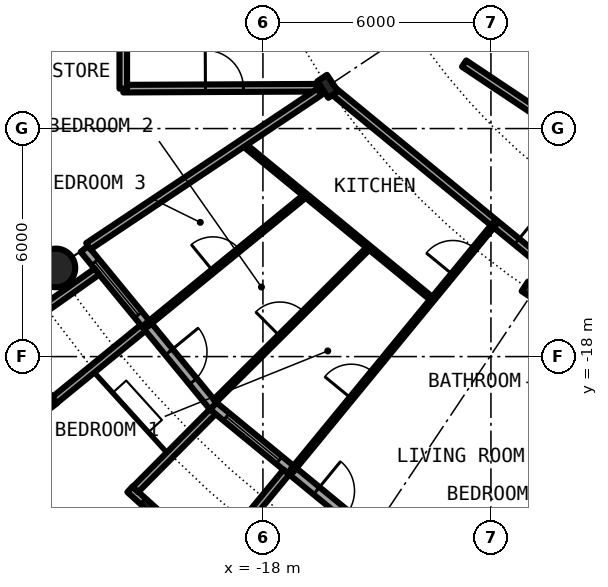
"""IFC4 building model, lengths in metres.
Left out: names, types, materials, properties, quantities, classifications, styles, units other than length and angle.
Written with IfcOpenShell. Run it as: python <this file> out.ifc"""

import sys

from ifc_helpers import new_model, si_unit, direction, frame, frame_2d, origin, origin_2d, place, context, subcontext, project, spatial, rectangle, circle, hollow_circle, i_section, extrude, element, fill, save


model = new_model("IFC4")
c1 = context("Model", 3, precision=1e-05, world=origin(), true_north=direction((0.0, 1.0)))
c2 = subcontext(c1, "Body", "Model", "MODEL_VIEW")
j1 = project(units=[si_unit("LENGTHUNIT", "METRE"), si_unit("PLANEANGLEUNIT", "RADIAN")], contexts=[c1])
p1 = place(None, origin())
s1 = spatial("IfcSite", under=j1, at=p1, CompositionType="ELEMENT")
p2 = place(p1, origin())
s2 = spatial("IfcBuilding", under=s1, at=p2, CompositionType="ELEMENT")
p3 = place(p2, frame((0.0, 0.0, 91.05)))
s3 = spatial("IfcBuildingStorey", under=s2, at=p3, CompositionType="ELEMENT", Elevation=91.05)
p4 = place(p3, frame((-23.448, -15.667, 0.0), z_axis=(0.0, 0.0, 1.0), x_axis=(1.0, 0.0, 0.0)))
e1 = element("IfcColumn", 1, at=p4, inside=s3, PredefinedType="COLUMN", context=c2, shape_type="SweptSolid", body=[
    extrude(hollow_circle(Radius=0.508, WallThickness=0.04, at=origin_2d()), origin(), (0.0, 0.0, 1.0), 3.05),
])
for number, where, z_axis, x_axis in (
    (2, (-16.297, -10.889, 0.0), (0.0, 0.0, 1.0), (-0.831, -0.556, 0.0)),
    (3, (-10.889, -16.297, 0.0), (0.0, 0.0, 1.0), (-0.556, -0.831, 0.0)),
):
    element("IfcColumn", number, at=place(p3, frame(where, z_axis=z_axis, x_axis=x_axis)), inside=s3, PredefinedType="COLUMN", context=c2, shape_type="SweptSolid", body=[
        extrude(i_section(OverallWidth=0.306, OverallDepth=0.524, WebThickness=0.021, FlangeThickness=0.04, FilletRadius=0.027, at=origin_2d()), origin(), (0.0, 0.0, 1.0), 3.05),
    ])
p5 = place(p3, frame((-22.699, -15.167, 0.0), z_axis=(0.0, 0.0, 1.0), x_axis=(0.634382322723, -0.773019449054, 0.0)))
e4 = element("IfcWall", 4, at=p5, inside=s3, PredefinedType="SOLIDWALL", context=c2, shape_type="SweptSolid", body=[
    extrude(rectangle(XDim=5.352, YDim=0.25, at=frame_2d((2.676, 0.0))), origin(), (0.0, 0.0, 1.0), 2.7),
])
p6 = place(p5, frame((0.441, 0.0, 0.3)))
e5 = element("IfcOpeningElement", 5, at=p6, cuts=e4, PredefinedType="OPENING", context=c2, shape_type="SweptSolid", body=[
    extrude(rectangle(XDim=1.8, YDim=2.1, at=frame_2d((0.9, 1.05))), frame((0.0, 0.135, 0.0), z_axis=(0.0, -1.0, 0.0), x_axis=(1.0, 0.0, 0.0)), (0.0, 0.0, 1.0), 0.27),
])
p7 = place(p5, frame((3.51, 0.0, 0.0)))
e6 = element("IfcOpeningElement", 6, at=p7, cuts=e4, PredefinedType="OPENING", context=c2, shape_type="SweptSolid", body=[
    extrude(rectangle(XDim=1.0, YDim=2.2, at=frame_2d((0.5, 1.1))), frame((0.0, 0.135, 0.0), z_axis=(0.0, -1.0, 0.0), x_axis=(1.0, 0.0, 0.0)), (0.0, 0.0, 1.0), 0.27),
])
p8 = place(p3, frame((-24.909, -17.427, -0.03), z_axis=(0.0, 0.0, 1.0), x_axis=(0.60418752353, -0.796842165306, 0.0)))
e7 = element("IfcWall", 7, at=p8, inside=s3, PredefinedType="SOLIDWALL", context=c2, shape_type="SweptSolid", body=[
    extrude(rectangle(XDim=2.337, YDim=0.2, at=frame_2d((1.168, 0.0))), origin(), (0.0, 0.0, 1.0), 2.73),
])
p9 = place(p8, frame((0.128, 0.0, 0.33)))
e8 = element("IfcOpeningElement", 8, at=p9, cuts=e7, PredefinedType="OPENING", context=c2, shape_type="SweptSolid", body=[
    extrude(circle(Radius=1.04, at=frame_2d((1.04, 1.04))), frame((0.0, 0.11, 0.0), z_axis=(0.0, -1.0, 0.0), x_axis=(1.0, 0.0, 0.0)), (0.0, 0.0, 1.0), 0.22),
])
p10 = place(p3, frame((-22.37, -15.765, -0.03), z_axis=(0.0, 0.0, 1.0), x_axis=(-0.817256123454, -0.576274612209, 0.0)))
e9 = element("IfcWall", 9, at=p10, inside=s3, PredefinedType="SOLIDWALL", context=c2, shape_type="SweptSolid", body=[
    extrude(rectangle(XDim=2.933, YDim=0.2, at=frame_2d((1.466, 0.0))), origin(), (0.0, 0.0, 1.0), 2.73),
])
p11 = place(p3, frame((-21.155, -17.246, -0.03), z_axis=(0.0, 0.0, 1.0), x_axis=(-0.775179004516, -0.631741648902, 0.0)))
e10 = element("IfcWall", 10, at=p11, inside=s3, PredefinedType="SOLIDWALL", context=c2, shape_type="SweptSolid", body=[
    extrude(rectangle(XDim=3.006, YDim=0.2, at=frame_2d((1.503, 0.0))), origin(), (0.0, 0.0, 1.0), 2.73),
])
p12 = place(p3, frame((-19.304, -19.304, 0.0), z_axis=(0.0, 0.0, 1.0), x_axis=(0.773019449054, -0.634382322723, 0.0)))
e11 = element("IfcWall", 11, at=p12, inside=s3, PredefinedType="SOLIDWALL", context=c2, shape_type="SweptSolid", body=[
    extrude(rectangle(XDim=5.352, YDim=0.25, at=frame_2d((2.676, 0.0))), origin(), (0.0, 0.0, 1.0), 2.7),
])
p13 = place(p12, frame((0.441, 0.0, 0.3)))
e12 = element("IfcOpeningElement", 12, at=p13, cuts=e11, PredefinedType="OPENING", context=c2, shape_type="SweptSolid", body=[
    extrude(rectangle(XDim=1.8, YDim=2.1, at=frame_2d((0.9, 1.05))), frame((0.0, 0.135, 0.0), z_axis=(0.0, -1.0, 0.0), x_axis=(1.0, 0.0, 0.0)), (0.0, 0.0, 1.0), 0.27),
])
p14 = place(p12, frame((3.51, 0.0, 0.0)))
e13 = element("IfcOpeningElement", 13, at=p14, cuts=e11, PredefinedType="OPENING", context=c2, shape_type="SweptSolid", body=[
    extrude(rectangle(XDim=1.0, YDim=2.2, at=frame_2d((0.5, 1.1))), frame((0.0, 0.135, 0.0), z_axis=(0.0, -1.0, 0.0), x_axis=(1.0, 0.0, 0.0)), (0.0, 0.0, 1.0), 0.27),
])
p15 = place(p3, frame((-21.5, -21.493, -0.03), z_axis=(0.0, 0.0, 1.0), x_axis=(0.740998365753, -0.671506829416, 0.0)))
e14 = element("IfcWall", 14, at=p15, inside=s3, PredefinedType="SOLIDWALL", context=c2, shape_type="SweptSolid", body=[
    extrude(rectangle(XDim=2.993, YDim=0.2, at=frame_2d((1.497, 0.0))), origin(), (0.0, 0.0, 1.0), 2.73),
])
p16 = place(p15, frame((0.457, 0.0, 0.33)))
e15 = element("IfcOpeningElement", 15, at=p16, cuts=e14, PredefinedType="OPENING", context=c2, shape_type="SweptSolid", body=[
    extrude(circle(Radius=1.04, at=frame_2d((1.04, 1.04))), frame((0.0, 0.11, 0.0), z_axis=(0.0, -1.0, 0.0), x_axis=(1.0, 0.0, 0.0)), (0.0, 0.0, 1.0), 0.22),
])
p17 = place(p3, frame((-19.323, -19.45, -0.03), z_axis=(0.0, 0.0, 1.0), x_axis=(-0.704476739375, -0.709727076896, 0.0)))
e16 = element("IfcWall", 16, at=p17, inside=s3, PredefinedType="SOLIDWALL", context=c2, shape_type="SweptSolid", body=[
    extrude(rectangle(XDim=2.883, YDim=0.2, at=frame_2d((1.441, 0.0))), origin(), (0.0, 0.0, 1.0), 2.73),
])
p18 = place(p3, frame((-17.384, -21.041, -0.03), z_axis=(0.0, 0.0, 1.0), x_axis=(-0.63709551667, -0.770784861449, 0.0)))
e17 = element("IfcWall", 17, at=p18, inside=s3, PredefinedType="SOLIDWALL", context=c2, shape_type="SweptSolid", body=[
    extrude(rectangle(XDim=3.006, YDim=0.2, at=frame_2d((1.503, 0.0))), origin(), (0.0, 0.0, 1.0), 2.73),
])
p19 = place(p3, frame((-18.542, -12.389, 0.0), z_axis=(0.0, 0.0, 1.0), x_axis=(0.77296666644, -0.634446634929, 0.0)))
e18 = element("IfcWall", 18, at=p19, inside=s3, PredefinedType="PARTITIONING", context=c2, shape_type="SweptSolid", body=[
    extrude(rectangle(XDim=6.474, YDim=0.1, at=frame_2d((3.237, 0.0))), origin(), (0.0, 0.0, 1.0), 2.7),
])
p20 = place(p3, frame((-16.173, -10.991, 0.0), z_axis=(0.0, 0.0, 1.0), x_axis=(0.773013989296, -0.634388975591, 0.0)))
e19 = element("IfcWall", 19, at=p20, inside=s3, PredefinedType="PARTITIONING", context=c2, shape_type="SweptSolid", body=[
    extrude(rectangle(XDim=11.219, YDim=0.2, at=frame_2d((5.609, 0.0))), origin(), (0.0, 0.0, 1.0), 2.38),
])
p21 = place(p20, frame((6.278, 0.0, 0.0)))
e20 = element("IfcOpeningElement", 20, at=p21, cuts=e19, PredefinedType="OPENING", context=c2, shape_type="SweptSolid", body=[
    extrude(rectangle(XDim=1.0, YDim=2.3, at=frame_2d((0.5, 1.15))), frame((0.0, 0.11, 0.0), z_axis=(0.0, -1.0, 0.0), x_axis=(1.0, 0.0, 0.0)), (0.0, 0.0, 1.0), 0.22),
])
p22 = place(p3, frame((-12.706, -10.291, 0.0), z_axis=(0.0, 0.0, 1.0), x_axis=(0.831588572532, -0.555392155178, 0.0)))
e21 = element("IfcWall", 21, at=p22, inside=s3, PredefinedType="PARTITIONING", context=c2, shape_type="SweptSolid", body=[
    extrude(rectangle(XDim=11.314, YDim=0.2, at=frame_2d((5.657, 0.0))), origin(), (0.0, 0.0, 1.0), 2.7),
])
p23 = place(p22, frame((5.966, 0.0, 0.0)))
e22 = element("IfcOpeningElement", 22, at=p23, cuts=e21, PredefinedType="OPENING", context=c2, shape_type="SweptSolid", body=[
    extrude(rectangle(XDim=1.0, YDim=2.3, at=frame_2d((0.5, 1.15))), frame((0.0, 0.11, 0.0), z_axis=(0.0, -1.0, 0.0), x_axis=(1.0, 0.0, 0.0)), (0.0, 0.0, 1.0), 0.22),
])
p24 = place(p3, frame((-21.675, -10.95, 0.0), z_axis=(0.0, 0.0, 1.0), x_axis=(0.999988944514, 0.004702217579, 0.0)))
e23 = element("IfcWall", 23, at=p24, inside=s3, PredefinedType="PARTITIONING", context=c2, shape_type="SweptSolid", body=[
    extrude(rectangle(XDim=5.088, YDim=0.2, at=frame_2d((2.544, 0.0))), origin(), (0.0, 0.0, 1.0), 2.7),
])
p25 = place(p24, frame((2.162, 0.0, 0.0)))
e24 = element("IfcOpeningElement", 24, at=p25, cuts=e23, PredefinedType="OPENING", context=c2, shape_type="SweptSolid", body=[
    extrude(rectangle(XDim=1.0, YDim=2.3, at=frame_2d((0.5, 1.15))), frame((0.0, 0.11, 0.0), z_axis=(0.0, -1.0, 0.0), x_axis=(1.0, 0.0, 0.0)), (0.0, 0.0, 1.0), 0.22),
])
p26 = place(p3, frame((-22.595, -15.097, 0.0), z_axis=(0.0, 0.0, 1.0), x_axis=(0.831505405283, 0.555516661303, 0.0)))
e25 = element("IfcWall", 25, at=p26, inside=s3, PredefinedType="PARTITIONING", context=c2, shape_type="SweptSolid", body=[
    extrude(rectangle(XDim=7.312, YDim=0.2, at=frame_2d((3.656, 0.0))), origin(), (0.0, 0.0, 1.0), 2.7),
])
p27 = place(p3, frame((-21.061, -17.173, 0.0), z_axis=(0.0, 0.0, 1.0), x_axis=(0.774926754572, 0.632051046236, 0.0)))
e26 = element("IfcWall", 26, at=p27, inside=s3, PredefinedType="PARTITIONING", context=c2, shape_type="SweptSolid", body=[
    extrude(rectangle(XDim=5.403, YDim=0.1, at=frame_2d((2.702, 0.0))), origin(), (0.0, 0.0, 1.0), 2.7),
])
p28 = place(p27, frame((2.252, 0.0, 0.0)))
e27 = element("IfcOpeningElement", 27, at=p28, cuts=e26, PredefinedType="OPENING", context=c2, shape_type="SweptSolid", body=[
    extrude(rectangle(XDim=0.9, YDim=2.3, at=frame_2d((0.45, 1.15))), frame((0.0, 0.06, 0.0), z_axis=(0.0, -1.0, 0.0), x_axis=(1.0, 0.0, 0.0)), (0.0, 0.0, 1.0), 0.12),
])
p29 = place(p3, frame((-19.265, -19.166, 0.0), z_axis=(0.0, 0.0, 1.0), x_axis=(0.708831450128, 0.705377895393, 0.0)))
e28 = element("IfcWall", 28, at=p29, inside=s3, PredefinedType="PARTITIONING", context=c2, shape_type="SweptSolid", body=[
    extrude(rectangle(XDim=5.726, YDim=0.1, at=frame_2d((2.863, 0.0))), origin(), (0.0, 0.0, 1.0), 2.7),
])
p30 = place(p29, frame((2.413, 0.0, 0.0)))
e29 = element("IfcOpeningElement", 29, at=p30, cuts=e28, PredefinedType="OPENING", context=c2, shape_type="SweptSolid", body=[
    extrude(rectangle(XDim=0.9, YDim=2.3, at=frame_2d((0.45, 1.15))), frame((0.0, 0.06, 0.0), z_axis=(0.0, -1.0, 0.0), x_axis=(1.0, 0.0, 0.0)), (0.0, 0.0, 1.0), 0.12),
])
p31 = place(p3, frame((-17.241, -21.006, 0.0), z_axis=(0.0, 0.0, 1.0), x_axis=(0.634522338131, 0.772904523478, 0.0)))
e30 = element("IfcWall", 30, at=p31, inside=s3, PredefinedType="PARTITIONING", context=c2, shape_type="SweptSolid", body=[
    extrude(rectangle(XDim=8.419, YDim=0.1, at=frame_2d((4.209, 0.0))), origin(), (0.0, 0.0, 1.0), 2.7),
])
p32 = place(p31, frame((6.677, 0.0, 0.0)))
e31 = element("IfcOpeningElement", 31, at=p32, cuts=e30, PredefinedType="OPENING", context=c2, shape_type="SweptSolid", body=[
    extrude(rectangle(XDim=0.9, YDim=2.3, at=frame_2d((0.45, 1.15))), frame((0.0, 0.06, 0.0), z_axis=(0.0, -1.0, 0.0), x_axis=(1.0, 0.0, 0.0)), (0.0, 0.0, 1.0), 0.12),
])
p33 = place(p31, frame((2.466, 0.0, 0.0)))
e32 = element("IfcOpeningElement", 32, at=p33, cuts=e30, PredefinedType="OPENING", context=c2, shape_type="SweptSolid", body=[
    extrude(rectangle(XDim=0.9, YDim=2.3, at=frame_2d((0.45, 1.15))), frame((0.0, 0.06, 0.0), z_axis=(0.0, -1.0, 0.0), x_axis=(1.0, 0.0, 0.0)), (0.0, 0.0, 1.0), 0.12),
])
p34 = place(p3, frame((-21.675, -10.95, 0.0), z_axis=(0.0, 0.0, 1.0), x_axis=(0.0, 1.0, 0.0)))
e33 = element("IfcWall", 33, at=p34, inside=s3, PredefinedType="PARTITIONING", context=c2, shape_type="SweptSolid", body=[
    extrude(rectangle(XDim=1.65, YDim=0.2, at=frame_2d((0.825, 0.0))), origin(), (0.0, 0.0, 1.0), 2.7),
])
p35 = place(p6, origin())
e34 = element("IfcWindow", 34, at=p35, inside=s3, PartitioningType="SINGLE_PANEL", PredefinedType="WINDOW", context=c2, shape_type="SweptSolid", body=[
    extrude(rectangle(XDim=1.8, YDim=2.1, at=frame_2d((0.9, 1.05))), frame((0.0, 0.03, 0.0), z_axis=(0.0, -1.0, 0.0), x_axis=(1.0, 0.0, 0.0)), (0.0, 0.0, 1.0), 0.06),
])
fill(e5, e34)
p36 = place(p7, origin())
e35 = element("IfcDoor", 35, at=p36, inside=s3, OperationType="SINGLE_SWING_LEFT", PredefinedType="DOOR", context=c2, shape_type="SweptSolid", body=[
    extrude(rectangle(XDim=1.0, YDim=2.2, at=frame_2d((0.5, 1.1))), frame((0.0, 0.025, 0.0), z_axis=(0.0, -1.0, 0.0), x_axis=(1.0, 0.0, 0.0)), (0.0, 0.0, 1.0), 0.05),
])
fill(e6, e35)
p37 = place(p13, origin())
e36 = element("IfcWindow", 36, at=p37, inside=s3, PartitioningType="SINGLE_PANEL", PredefinedType="WINDOW", context=c2, shape_type="SweptSolid", body=[
    extrude(rectangle(XDim=1.8, YDim=2.1, at=frame_2d((0.9, 1.05))), frame((0.0, 0.03, 0.0), z_axis=(0.0, -1.0, 0.0), x_axis=(1.0, 0.0, 0.0)), (0.0, 0.0, 1.0), 0.06),
])
fill(e12, e36)
p38 = place(p16, origin())
e37 = element("IfcWindow", 37, at=p38, inside=s3, PartitioningType="SINGLE_PANEL", PredefinedType="WINDOW", context=c2, shape_type="SweptSolid", body=[
    extrude(circle(Radius=1.04, at=frame_2d((1.04, 1.04))), frame((0.0, 0.03, 0.0), z_axis=(0.0, -1.0, 0.0), x_axis=(1.0, 0.0, 0.0)), (0.0, 0.0, 1.0), 0.06),
])
fill(e15, e37)
p39 = place(p14, origin())
e38 = element("IfcDoor", 38, at=p39, inside=s3, OperationType="SINGLE_SWING_LEFT", PredefinedType="DOOR", context=c2, shape_type="SweptSolid", body=[
    extrude(rectangle(XDim=1.0, YDim=2.2, at=frame_2d((0.5, 1.1))), frame((0.0, 0.025, 0.0), z_axis=(0.0, -1.0, 0.0), x_axis=(1.0, 0.0, 0.0)), (0.0, 0.0, 1.0), 0.05),
])
fill(e13, e38)
p40 = place(p21, origin())
e39 = element("IfcDoor", 39, at=p40, inside=s3, OperationType="SINGLE_SWING_RIGHT", PredefinedType="DOOR", context=c2, shape_type="SweptSolid", body=[
    extrude(rectangle(XDim=1.0, YDim=2.3, at=frame_2d((0.5, 1.15))), frame((0.0, 0.025, 0.0), z_axis=(0.0, -1.0, 0.0), x_axis=(1.0, 0.0, 0.0)), (0.0, 0.0, 1.0), 0.05),
])
fill(e20, e39)
p41 = place(p32, origin())
e40 = element("IfcDoor", 40, at=p41, inside=s3, OperationType="SINGLE_SWING_RIGHT", PredefinedType="DOOR", context=c2, shape_type="SweptSolid", body=[
    extrude(rectangle(XDim=0.9, YDim=2.3, at=frame_2d((0.45, 1.15))), frame((0.0, 0.025, 0.0), z_axis=(0.0, -1.0, 0.0), x_axis=(1.0, 0.0, 0.0)), (0.0, 0.0, 1.0), 0.05),
])
fill(e31, e40)
p42 = place(p33, origin())
e41 = element("IfcDoor", 41, at=p42, inside=s3, OperationType="SINGLE_SWING_LEFT", PredefinedType="DOOR", context=c2, shape_type="SweptSolid", body=[
    extrude(rectangle(XDim=0.9, YDim=2.3, at=frame_2d((0.45, 1.15))), frame((0.0, 0.025, 0.0), z_axis=(0.0, -1.0, 0.0), x_axis=(1.0, 0.0, 0.0)), (0.0, 0.0, 1.0), 0.05),
])
fill(e32, e41)
p43 = place(p30, origin())
e42 = element("IfcDoor", 42, at=p43, inside=s3, OperationType="SINGLE_SWING_LEFT", PredefinedType="DOOR", context=c2, shape_type="SweptSolid", body=[
    extrude(rectangle(XDim=0.9, YDim=2.3, at=frame_2d((0.45, 1.15))), frame((0.0, 0.025, 0.0), z_axis=(0.0, -1.0, 0.0), x_axis=(1.0, 0.0, 0.0)), (0.0, 0.0, 1.0), 0.05),
])
fill(e29, e42)
p44 = place(p28, origin())
e43 = element("IfcDoor", 43, at=p44, inside=s3, OperationType="SINGLE_SWING_RIGHT", PredefinedType="DOOR", context=c2, shape_type="SweptSolid", body=[
    extrude(rectangle(XDim=0.9, YDim=2.3, at=frame_2d((0.45, 1.15))), frame((0.0, 0.025, 0.0), z_axis=(0.0, -1.0, 0.0), x_axis=(1.0, 0.0, 0.0)), (0.0, 0.0, 1.0), 0.05),
])
fill(e27, e43)
p45 = place(p25, origin())
e44 = element("IfcDoor", 44, at=p45, inside=s3, OperationType="SINGLE_SWING_RIGHT", PredefinedType="DOOR", context=c2, shape_type="SweptSolid", body=[
    extrude(rectangle(XDim=1.0, YDim=2.3, at=frame_2d((0.5, 1.15))), frame((0.0, 0.025, 0.0), z_axis=(0.0, -1.0, 0.0), x_axis=(1.0, 0.0, 0.0)), (0.0, 0.0, 1.0), 0.05),
])
fill(e24, e44)
save(model, sys.argv[1])
